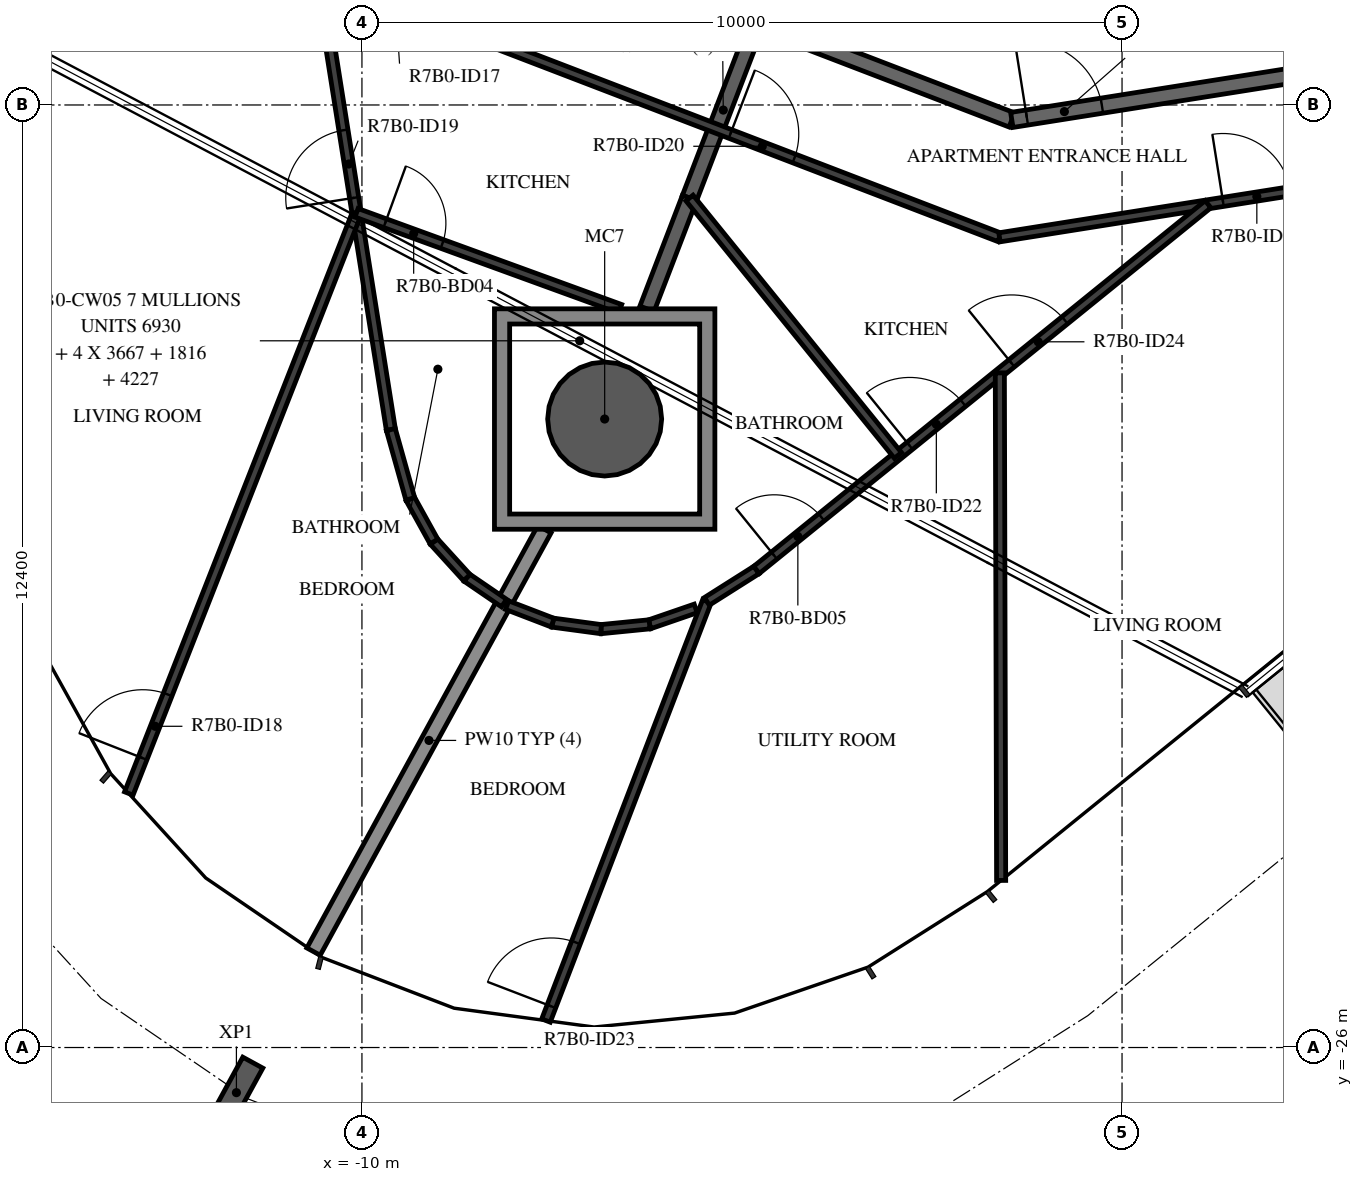
"""IFC4 building model, lengths in metres.
Left out: names, types, materials, properties, quantities, classifications, styles, units other than length and angle.
Written with IfcOpenShell. Run it as: python <this file> out.ifc"""

import sys

from ifc_helpers import new_model, si_unit, direction, frame, frame_2d, origin, origin_2d, place, context, subcontext, project, spatial, polyline, rectangle, hollow_circle, i_section, outline, extrude, element, fill, save


model = new_model("IFC4")
c1 = context("Model", 3, precision=1e-05, world=origin(), true_north=direction((0.0, 1.0)))
c2 = subcontext(c1, "Body", "Model", "MODEL_VIEW")
j1 = project(units=[si_unit("LENGTHUNIT", "METRE"), si_unit("PLANEANGLEUNIT", "RADIAN")], contexts=[c1])
p1 = place(None, origin())
s1 = spatial("IfcSite", under=j1, at=p1, CompositionType="ELEMENT")
p2 = place(p1, origin())
s2 = spatial("IfcBuilding", under=s1, at=p2, CompositionType="ELEMENT")
p3 = place(p2, frame((0.0, 0.0, 277.4)))
s3 = spatial("IfcBuildingStorey", under=s2, at=p3, CompositionType="ELEMENT", Elevation=277.4)
p4 = place(p3, frame((-6.807, -17.732, -0.38), z_axis=(0.0, 0.0, 1.0), x_axis=(1.0, 0.0, 0.0)))
e1 = element("IfcColumn", 1, at=p4, inside=s3, PredefinedType="COLUMN", context=c2, shape_type="SweptSolid", body=[
    extrude(hollow_circle(Radius=0.75, WallThickness=0.035, at=origin_2d()), origin(), (0.0, 0.0, 1.0), 3.5),
])
p5 = place(p3, frame((-11.652, -26.594, -0.38), z_axis=(0.0, 0.0, 1.0), x_axis=(-0.877434810632, 0.479695896472, 0.0)))
e2 = element("IfcColumn", 2, at=p5, inside=s3, PredefinedType="COLUMN", context=c2, shape_type="SweptSolid", body=[
    extrude(i_section(OverallWidth=0.3, OverallDepth=0.9, WebThickness=0.019, FlangeThickness=0.035, FilletRadius=0.03, at=origin_2d()), origin(), (0.0, 0.0, 1.0), 3.5),
])
p6 = place(p3, frame((-8.154, -11.223, 0.0), z_axis=(0.0, 0.0, 1.0), x_axis=(0.93359073609, -0.358341090983, 0.0)))
e3 = element("IfcWall", 3, at=p6, inside=s3, PredefinedType="STANDARD", context=c2, shape_type="SweptSolid", body=[
    extrude(rectangle(XDim=7.181, YDim=0.2, at=frame_2d((3.59, 0.0))), origin(), (0.0, 0.0, 1.0), 3.12),
])
p7 = place(p6, frame((2.39, 0.0, 0.0)))
e4 = element("IfcOpeningElement", 4, at=p7, cuts=e3, PredefinedType="OPENING", context=c2, shape_type="SweptSolid", body=[
    extrude(rectangle(XDim=1.0, YDim=2.1, at=frame_2d((0.5, 1.05))), frame((0.0, 0.11, 0.0), z_axis=(0.0, -1.0, 0.0), x_axis=(1.0, 0.0, 0.0)), (0.0, 0.0, 1.0), 0.22),
])
p8 = place(p3, frame((-1.45, -13.797, 0.0), z_axis=(0.0, 0.0, 1.0), x_axis=(0.987690361611, 0.156421704315, 0.0)))
e5 = element("IfcWall", 5, at=p8, inside=s3, PredefinedType="STANDARD", context=c2, shape_type="SweptSolid", body=[
    extrude(rectangle(XDim=7.181, YDim=0.2, at=frame_2d((3.591, 0.0))), origin(), (0.0, 0.0, 1.0), 3.12),
])
p9 = place(p8, frame((0.2, 0.0, 0.0)))
e6 = element("IfcOpeningElement", 6, at=p9, cuts=e5, PredefinedType="OPENING", context=c2, shape_type="SweptSolid", body=[
    extrude(rectangle(XDim=1.0, YDim=2.1, at=frame_2d((0.5, 1.05))), frame((0.0, 0.11, 0.0), z_axis=(0.0, -1.0, 0.0), x_axis=(1.0, 0.0, 0.0)), (0.0, 0.0, 1.0), 0.22),
])
p10 = place(p3, frame((-5.69, -14.824, 0.0), z_axis=(0.0, 0.0, 1.0), x_axis=(0.358345342952, 0.933589104041, 0.0)))
e7 = element("IfcWall", 7, at=p10, inside=s3, PredefinedType="STANDARD", context=c2, shape_type="SweptSolid", body=[
    extrude(rectangle(XDim=2.479, YDim=0.2, at=frame_2d((1.239, 0.0))), origin(), (0.0, 0.0, 1.0), 3.12),
])
p11 = place(p3, frame((-6.25, -16.282, 0.0), z_axis=(0.0, 0.0, 1.0), x_axis=(0.358360842469, 0.933583154617, 0.0)))
e8 = element("IfcWall", 8, at=p11, inside=s3, PredefinedType="STANDARD", context=c2, shape_type="SweptSolid", body=[
    extrude(rectangle(XDim=1.562, YDim=0.2, at=frame_2d((0.781, 0.0))), origin(), (0.0, 0.0, 1.0), 3.12),
])
p12 = place(p3, frame((-10.637, -24.738, 0.0), z_axis=(0.0, 0.0, 1.0), x_axis=(0.479683887596, 0.877441375808, 0.0)))
e9 = element("IfcWall", 9, at=p12, inside=s3, PredefinedType="STANDARD", context=c2, shape_type="SweptSolid", body=[
    extrude(rectangle(XDim=6.333, YDim=0.2, at=frame_2d((3.166, 0.0))), origin(), (0.0, 0.0, 1.0), 2.73),
])
p13 = place(p3, frame((-9.067, -12.479, 0.0), z_axis=(0.0, 0.0, 1.0), x_axis=(0.933579449035, -0.358370495911, 0.0)))
e10 = element("IfcWall", 10, at=p13, inside=s3, PredefinedType="PARTITIONING", context=c2, shape_type="SweptSolid", body=[
    extrude(rectangle(XDim=7.985, YDim=0.12, at=frame_2d((3.992, 0.0))), origin(), (0.0, 0.0, 1.0), 3.12),
])
p14 = place(p13, frame((4.192, 0.0, 0.0)))
e11 = element("IfcOpeningElement", 11, at=p14, cuts=e10, PredefinedType="OPENING", context=c2, shape_type="SweptSolid", body=[
    extrude(rectangle(XDim=0.9, YDim=2.1, at=frame_2d((0.45, 1.05))), frame((0.0, 0.07, 0.0), z_axis=(0.0, -1.0, 0.0), x_axis=(1.0, 0.0, 0.0)), (0.0, 0.0, 1.0), 0.14),
])
p15 = place(p3, frame((-9.619, -17.871, 0.0), z_axis=(0.0, 0.0, 1.0), x_axis=(-0.156433255633, 0.987688532146, 0.0)))
e12 = element("IfcWall", 12, at=p15, inside=s3, PredefinedType="PARTITIONING", context=c2, shape_type="SweptSolid", body=[
    extrude(rectangle(XDim=7.644, YDim=0.12, at=frame_2d((3.822, 0.0))), origin(), (0.0, 0.0, 1.0), 3.12),
])
p16 = place(p15, frame((3.087, 0.0, 0.0)))
e13 = element("IfcOpeningElement", 13, at=p16, cuts=e12, PredefinedType="OPENING", context=c2, shape_type="SweptSolid", body=[
    extrude(rectangle(XDim=0.9, YDim=2.1, at=frame_2d((0.45, 1.05))), frame((0.0, 0.07, 0.0), z_axis=(0.0, -1.0, 0.0), x_axis=(1.0, 0.0, 0.0)), (0.0, 0.0, 1.0), 0.14),
])
p17 = place(p3, frame((-13.067, -22.658, 0.0), z_axis=(0.0, 0.0, 1.0), x_axis=(0.365785999331, 0.930698986082, 0.0)))
e14 = element("IfcWall", 14, at=p17, inside=s3, PredefinedType="PARTITIONING", context=c2, shape_type="SweptSolid", body=[
    extrude(rectangle(XDim=8.196, YDim=0.12, at=frame_2d((4.098, 0.0))), origin(), (0.0, 0.0, 1.0), 3.12),
])
p18 = place(p17, frame((0.5, 0.0, 0.0)))
e15 = element("IfcOpeningElement", 15, at=p18, cuts=e14, PredefinedType="OPENING", context=c2, shape_type="SweptSolid", body=[
    extrude(rectangle(XDim=0.9, YDim=2.1, at=frame_2d((0.45, 1.05))), frame((0.0, 0.07, 0.0), z_axis=(0.0, -1.0, 0.0), x_axis=(1.0, 0.0, 0.0)), (0.0, 0.0, 1.0), 0.14),
])
p19 = place(p3, frame((-10.071, -15.019, 0.0), z_axis=(0.0, 0.0, 1.0), x_axis=(0.939648507355, -0.34214131967, 0.0)))
e16 = element("IfcWall", 16, at=p19, inside=s3, PredefinedType="PARTITIONING", context=c2, shape_type="SweptSolid", body=[
    extrude(rectangle(XDim=3.691, YDim=0.12, at=frame_2d((1.846, 0.0))), origin(), (0.0, 0.0, 1.0), 3.12),
])
p20 = place(p19, frame((0.4, 0.0, 0.0)))
e17 = element("IfcOpeningElement", 17, at=p20, cuts=e16, PredefinedType="OPENING", context=c2, shape_type="SweptSolid", body=[
    extrude(rectangle(XDim=0.8, YDim=2.1, at=frame_2d((0.4, 1.05))), frame((0.0, 0.07, 0.0), z_axis=(0.0, -1.0, 0.0), x_axis=(1.0, 0.0, 0.0)), (0.0, 0.0, 1.0), 0.14),
])
p21 = place(p3, frame((-8.13, -20.153, 0.0), z_axis=(0.0, 0.0, 1.0), x_axis=(-0.825599905246, 0.564255967145, 0.0)))
e18 = element("IfcWall", 18, at=p21, inside=s3, PredefinedType="PARTITIONING", context=c2, shape_type="SweptSolid", body=[
    extrude(rectangle(XDim=0.593, YDim=0.12, at=frame_2d((0.297, 0.0))), origin(), (0.0, 0.0, 1.0), 3.12),
])
for number, where, z_axis, x_axis in (
    (19, (-8.62, -19.818, 0.0), (0.0, 0.0, 1.0), (-0.673, 0.739, 0.0)),
    (20, (-9.052, -19.344, 0.0), (0.0, 0.0, 1.0), (-0.485, 0.874, 0.0)),
):
    element("IfcWall", number, at=place(p3, frame(where, z_axis=z_axis, x_axis=x_axis)), inside=s3, PredefinedType="PARTITIONING", context=c2, shape_type="SweptSolid", body=[
        extrude(rectangle(XDim=0.642, YDim=0.12, at=frame_2d((0.321, 0.0))), origin(), (0.0, 0.0, 1.0), 3.12),
    ])
p22 = place(p3, frame((-9.364, -18.782, 0.0), z_axis=(0.0, 0.0, 1.0), x_axis=(-0.269811707714, 0.962913102196, 0.0)))
e21 = element("IfcWall", 21, at=p22, inside=s3, PredefinedType="PARTITIONING", context=c2, shape_type="SweptSolid", body=[
    extrude(rectangle(XDim=0.947, YDim=0.12, at=frame_2d((0.473, 0.0))), origin(), (0.0, 0.0, 1.0), 3.12),
])
p23 = place(p3, frame((-1.612, -15.341, 0.0), z_axis=(0.0, 0.0, 1.0), x_axis=(0.987687560018, 0.15643939333, 0.0)))
e22 = element("IfcWall", 22, at=p23, inside=s3, PredefinedType="PARTITIONING", context=c2, shape_type="SweptSolid", body=[
    extrude(rectangle(XDim=7.914, YDim=0.12, at=frame_2d((3.957, 0.0))), origin(), (0.0, 0.0, 1.0), 3.12),
])
p24 = place(p23, frame((2.978, 0.0, 0.0)))
e23 = element("IfcOpeningElement", 23, at=p24, cuts=e22, PredefinedType="OPENING", context=c2, shape_type="SweptSolid", body=[
    extrude(rectangle(XDim=0.9, YDim=2.1, at=frame_2d((0.45, 1.05))), frame((0.0, 0.07, 0.0), z_axis=(0.0, -1.0, 0.0), x_axis=(1.0, 0.0, 0.0)), (0.0, 0.0, 1.0), 0.14),
])
p25 = place(p3, frame((-5.609, -20.223, 0.0), z_axis=(0.0, 0.0, 1.0), x_axis=(-0.945401267449, -0.325908642882, 0.0)))
e24 = element("IfcWall", 24, at=p25, inside=s3, PredefinedType="PARTITIONING", context=c2, shape_type="SweptSolid", body=[
    extrude(rectangle(XDim=0.642, YDim=0.12, at=frame_2d((0.321, 0.0))), origin(), (0.0, 0.0, 1.0), 3.12),
])
for number, where, z_axis, x_axis in (
    (25, (-6.216, -20.433, 0.0), (0.0, 0.0, 1.0), (-0.995, -0.099, 0.0)),
    (26, (-6.855, -20.496, 0.0), (0.0, 0.0, 1.0), (-0.991, 0.133, 0.0)),
    (27, (-7.491, -20.41, 0.0), (0.0, 0.0, 1.0), (-0.933, 0.359, 0.0)),
):
    element("IfcWall", number, at=place(p3, frame(where, z_axis=z_axis, x_axis=x_axis)), inside=s3, PredefinedType="PARTITIONING", context=c2, shape_type="SweptSolid", body=[
        extrude(rectangle(XDim=0.642, YDim=0.12, at=frame_2d((0.321, 0.0))), origin(), (0.0, 0.0, 1.0), 3.12),
    ])
p26 = place(p3, frame((-7.579, -25.646, 0.0), z_axis=(0.0, 0.0, 1.0), x_axis=(0.358336526264, 0.933592488158, 0.0)))
e28 = element("IfcWall", 28, at=p26, inside=s3, PredefinedType="PARTITIONING", context=c2, shape_type="SweptSolid", body=[
    extrude(rectangle(XDim=5.908, YDim=0.12, at=frame_2d((2.954, 0.0))), origin(), (0.0, 0.0, 1.0), 3.12),
])
p27 = place(p26, frame((0.2, 0.0, 0.0)))
e29 = element("IfcOpeningElement", 29, at=p27, cuts=e28, PredefinedType="OPENING", context=c2, shape_type="SweptSolid", body=[
    extrude(rectangle(XDim=0.9, YDim=2.1, at=frame_2d((0.45, 1.05))), frame((0.0, 0.07, 0.0), z_axis=(0.0, -1.0, 0.0), x_axis=(1.0, 0.0, 0.0)), (0.0, 0.0, 1.0), 0.14),
])
p28 = place(p3, frame((-5.462, -20.13, 0.0), z_axis=(0.0, 0.0, 1.0), x_axis=(0.84494764883, 0.534849016768, 0.0)))
e30 = element("IfcWall", 30, at=p28, inside=s3, PredefinedType="PARTITIONING", context=c2, shape_type="SweptSolid", body=[
    extrude(rectangle(XDim=0.772, YDim=0.12, at=frame_2d((0.386, 0.0))), origin(), (0.0, 0.0, 1.0), 3.12),
])
p29 = place(p3, frame((-4.809, -19.717, 0.0), z_axis=(0.0, 0.0, 1.0), x_axis=(0.777140730041, 0.629326851255, 0.0)))
e31 = element("IfcWall", 31, at=p29, inside=s3, PredefinedType="PARTITIONING", context=c2, shape_type="SweptSolid", body=[
    extrude(rectangle(XDim=7.644, YDim=0.12, at=frame_2d((3.822, 0.0))), origin(), (0.0, 0.0, 1.0), 3.12),
])
p30 = place(p29, frame((2.594, 0.0, 0.0)))
e32 = element("IfcOpeningElement", 32, at=p30, cuts=e31, PredefinedType="OPENING", context=c2, shape_type="SweptSolid", body=[
    extrude(rectangle(XDim=0.9, YDim=2.1, at=frame_2d((0.45, 1.05))), frame((0.0, 0.07, 0.0), z_axis=(0.0, -1.0, 0.0), x_axis=(1.0, 0.0, 0.0)), (0.0, 0.0, 1.0), 0.14),
])
p31 = place(p29, frame((0.3, 0.0, 0.0)))
e33 = element("IfcOpeningElement", 33, at=p31, cuts=e31, PredefinedType="OPENING", context=c2, shape_type="SweptSolid", body=[
    extrude(rectangle(XDim=0.8, YDim=2.1, at=frame_2d((0.4, 1.05))), frame((0.0, 0.07, 0.0), z_axis=(0.0, -1.0, 0.0), x_axis=(1.0, 0.0, 0.0)), (0.0, 0.0, 1.0), 0.14),
])
p32 = place(p29, frame((4.319, 0.0, 0.0)))
e34 = element("IfcOpeningElement", 34, at=p32, cuts=e31, PredefinedType="OPENING", context=c2, shape_type="SweptSolid", body=[
    extrude(rectangle(XDim=0.9, YDim=2.1, at=frame_2d((0.45, 1.05))), frame((0.0, 0.07, 0.0), z_axis=(0.0, -1.0, 0.0), x_axis=(1.0, 0.0, 0.0)), (0.0, 0.0, 1.0), 0.14),
])
p33 = place(p3, frame((-2.948, -18.21, 0.0), z_axis=(0.0, 0.0, 1.0), x_axis=(-0.629330389268, 0.777137864953, 0.0)))
e35 = element("IfcWall", 35, at=p33, inside=s3, PredefinedType="PARTITIONING", context=c2, shape_type="SweptSolid", body=[
    extrude(rectangle(XDim=4.357, YDim=0.12, at=frame_2d((2.179, 0.0))), origin(), (0.0, 0.0, 1.0), 3.12),
])
p34 = place(p3, frame((-1.591, -23.802, 0.0), z_axis=(0.0, 0.0, 1.0), x_axis=(-0.002595969315, 0.999996630466, 0.0)))
e36 = element("IfcWall", 36, at=p34, inside=s3, PredefinedType="PARTITIONING", context=c2, shape_type="SweptSolid", body=[
    extrude(rectangle(XDim=6.677, YDim=0.12, at=frame_2d((3.339, 0.0))), origin(), (0.0, 0.0, 1.0), 3.12),
])
p35 = place(p3, origin())
e37 = element("IfcWall", 37, at=p35, inside=s3, PredefinedType="STANDARD", context=c2, shape_type="SweptSolid", body=[
    extrude(outline(polyline([(-5.357, -16.282), (-5.357, -19.182), (-8.257, -19.182), (-8.257, -16.282), (-5.357, -16.282)]), holes=[polyline([(-8.057, -18.982), (-5.557, -18.982), (-5.557, -16.482), (-8.057, -16.482), (-8.057, -18.982)])]), origin(), (0.0, 0.0, 1.0), 3.12),
])
p36 = place(p18, origin())
e38 = element("IfcDoor", 38, at=p36, inside=s3, OperationType="SINGLE_SWING_RIGHT", PredefinedType="DOOR", context=c2, shape_type="SweptSolid", body=[
    extrude(rectangle(XDim=0.9, YDim=2.1, at=frame_2d((0.45, 1.05))), frame((0.0, 0.025, 0.0), z_axis=(0.0, -1.0, 0.0), x_axis=(1.0, 0.0, 0.0)), (0.0, 0.0, 1.0), 0.05),
])
fill(e15, e38)
p37 = place(p20, origin())
e39 = element("IfcDoor", 39, at=p37, inside=s3, OperationType="SINGLE_SWING_RIGHT", PredefinedType="DOOR", context=c2, shape_type="SweptSolid", body=[
    extrude(rectangle(XDim=0.8, YDim=2.1, at=frame_2d((0.4, 1.05))), frame((0.0, 0.025, 0.0), z_axis=(0.0, -1.0, 0.0), x_axis=(1.0, 0.0, 0.0)), (0.0, 0.0, 1.0), 0.05),
])
fill(e17, e39)
p38 = place(p16, origin())
e40 = element("IfcDoor", 40, at=p38, inside=s3, OperationType="SINGLE_SWING_LEFT", PredefinedType="DOOR", context=c2, shape_type="SweptSolid", body=[
    extrude(rectangle(XDim=0.9, YDim=2.1, at=frame_2d((0.45, 1.05))), frame((0.0, 0.025, 0.0), z_axis=(0.0, -1.0, 0.0), x_axis=(1.0, 0.0, 0.0)), (0.0, 0.0, 1.0), 0.05),
])
fill(e13, e40)
p39 = place(p9, origin())
e41 = element("IfcDoor", 41, at=p39, inside=s3, OperationType="SINGLE_SWING_LEFT", PredefinedType="DOOR", context=c2, shape_type="SweptSolid", body=[
    extrude(rectangle(XDim=1.0, YDim=2.1, at=frame_2d((0.5, 1.05))), frame((0.0, 0.025, 0.0), z_axis=(0.0, -1.0, 0.0), x_axis=(1.0, 0.0, 0.0)), (0.0, 0.0, 1.0), 0.05),
])
fill(e6, e41)
p40 = place(p14, origin())
e42 = element("IfcDoor", 42, at=p40, inside=s3, OperationType="SINGLE_SWING_RIGHT", PredefinedType="DOOR", context=c2, shape_type="SweptSolid", body=[
    extrude(rectangle(XDim=0.9, YDim=2.1, at=frame_2d((0.45, 1.05))), frame((0.0, 0.025, 0.0), z_axis=(0.0, -1.0, 0.0), x_axis=(1.0, 0.0, 0.0)), (0.0, 0.0, 1.0), 0.05),
])
fill(e11, e42)
p41 = place(p24, origin())
e43 = element("IfcDoor", 43, at=p41, inside=s3, OperationType="SINGLE_SWING_LEFT", PredefinedType="DOOR", context=c2, shape_type="SweptSolid", body=[
    extrude(rectangle(XDim=0.9, YDim=2.1, at=frame_2d((0.45, 1.05))), frame((0.0, 0.025, 0.0), z_axis=(0.0, -1.0, 0.0), x_axis=(1.0, 0.0, 0.0)), (0.0, 0.0, 1.0), 0.05),
])
fill(e23, e43)
p42 = place(p30, origin())
e44 = element("IfcDoor", 44, at=p42, inside=s3, OperationType="SINGLE_SWING_LEFT", PredefinedType="DOOR", context=c2, shape_type="SweptSolid", body=[
    extrude(rectangle(XDim=0.9, YDim=2.1, at=frame_2d((0.45, 1.05))), frame((0.0, 0.025, 0.0), z_axis=(0.0, -1.0, 0.0), x_axis=(1.0, 0.0, 0.0)), (0.0, 0.0, 1.0), 0.05),
])
fill(e32, e44)
p43 = place(p27, origin())
e45 = element("IfcDoor", 45, at=p43, inside=s3, OperationType="SINGLE_SWING_LEFT", PredefinedType="DOOR", context=c2, shape_type="SweptSolid", body=[
    extrude(rectangle(XDim=0.9, YDim=2.1, at=frame_2d((0.45, 1.05))), frame((0.0, 0.025, 0.0), z_axis=(0.0, -1.0, 0.0), x_axis=(1.0, 0.0, 0.0)), (0.0, 0.0, 1.0), 0.05),
])
fill(e29, e45)
p44 = place(p31, origin())
e46 = element("IfcDoor", 46, at=p44, inside=s3, OperationType="SINGLE_SWING_RIGHT", PredefinedType="DOOR", context=c2, shape_type="SweptSolid", body=[
    extrude(rectangle(XDim=0.8, YDim=2.1, at=frame_2d((0.4, 1.05))), frame((0.0, 0.025, 0.0), z_axis=(0.0, -1.0, 0.0), x_axis=(1.0, 0.0, 0.0)), (0.0, 0.0, 1.0), 0.05),
])
fill(e33, e46)
p45 = place(p32, origin())
e47 = element("IfcDoor", 47, at=p45, inside=s3, OperationType="SINGLE_SWING_RIGHT", PredefinedType="DOOR", context=c2, shape_type="SweptSolid", body=[
    extrude(rectangle(XDim=0.9, YDim=2.1, at=frame_2d((0.45, 1.05))), frame((0.0, 0.025, 0.0), z_axis=(0.0, -1.0, 0.0), x_axis=(1.0, 0.0, 0.0)), (0.0, 0.0, 1.0), 0.05),
])
fill(e34, e47)
save(model, sys.argv[1])
